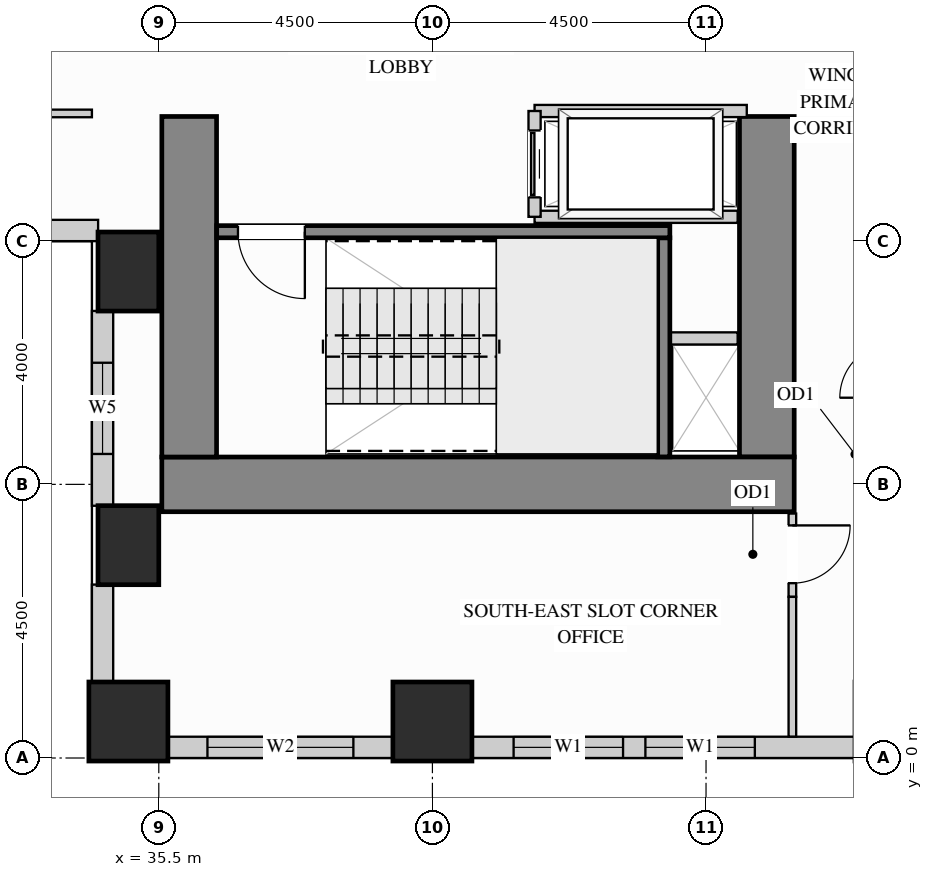
"""IFC4 building model, lengths in metres.
Left out: names, types, materials, properties, quantities, classifications, styles, units other than length and angle.
Written with IfcOpenShell. Run it as: python <this file> out.ifc"""

import sys

from ifc_helpers import new_model, si_unit, direction, frame, frame_2d, origin, origin_2d, place, context, subcontext, project, spatial, rectangle, extrude, source, transform, mapped, element, fill, save


model = new_model("IFC4")
c1 = context("Model", 3, precision=1e-05, world=origin(), true_north=direction((0.0, 1.0)))
c2 = subcontext(c1, "Body", "Model", "MODEL_VIEW")
j1 = project(units=[si_unit("LENGTHUNIT", "METRE"), si_unit("PLANEANGLEUNIT", "RADIAN")], contexts=[c1])
p1 = place(None, origin())
s1 = spatial("IfcSite", under=j1, at=p1, CompositionType="ELEMENT")
p2 = place(p1, origin())
s2 = spatial("IfcBuilding", under=s1, at=p2, CompositionType="ELEMENT")
p3 = place(p2, frame((0.0, 0.0, 26.1)))
s3 = spatial("IfcBuildingStorey", under=s2, at=p3, CompositionType="ELEMENT", Elevation=26.1)
m1 = source(origin(), c2, "Body", "SweptSolid", [
    extrude(rectangle(XDim=1.0, YDim=1.3, at=origin_2d()), origin(), (0.0, 0.0, 1.0), 3.38),
])
for number, where, z_axis, x_axis in (
    (1, (35.0, 3.5, 0.0), (0.0, 0.0, 1.0), (1.0, 0.0, 0.0)),
    (2, (35.0, 8.0, 0.0), (0.0, 0.0, 1.0), (1.0, 0.0, 0.0)),
):
    element("IfcColumn", number, at=place(p3, frame(where, z_axis=z_axis, x_axis=x_axis)), inside=s3, PredefinedType="COLUMN", context=c2, shape_type="MappedRepresentation", body=[
        mapped(m1, transform((0.0, 0.0, 0.0), x_axis=(1.0, 0.0, 0.0), y_axis=(0.0, 1.0, 0.0), z_axis=(0.0, 0.0, 1.0))),
    ])
m2 = source(origin(), c2, "Body", "SweptSolid", [
    extrude(rectangle(XDim=1.3, YDim=1.3, at=origin_2d()), origin(), (0.0, 0.0, 1.0), 3.38),
])
for number, where, z_axis, x_axis in (
    (3, (35.0, 0.6, 0.0), (0.0, 0.0, 1.0), (1.0, 0.0, 0.0)),
    (4, (40.0, 0.6, 0.0), (0.0, 0.0, 1.0), (1.0, 0.0, 0.0)),
):
    element("IfcColumn", number, at=place(p3, frame(where, z_axis=z_axis, x_axis=x_axis)), inside=s3, PredefinedType="COLUMN", context=c2, shape_type="MappedRepresentation", body=[
        mapped(m2, transform((0.0, 0.0, 0.0), x_axis=(1.0, 0.0, 0.0), y_axis=(0.0, 1.0, 0.0), z_axis=(0.0, 0.0, 1.0))),
    ])
m3 = source(origin(), c2, "Body", "SweptSolid", [
    extrude(rectangle(XDim=5.6, YDim=0.9, at=frame_2d((2.8, 0.0))), origin(), (0.0, 0.0, 1.0), 3.38),
])
p4 = place(p3, frame((45.5, 4.95, 0.0), z_axis=(0.0, 0.0, 1.0), x_axis=(0.0, 1.0, 0.0)))
e5 = element("IfcWall", 5, at=p4, inside=s3, PredefinedType="SHEAR", context=c2, shape_type="MappedRepresentation", body=[
    mapped(m3, transform((0.0, 0.0, 0.0), x_axis=(1.0, 0.0, 0.0), y_axis=(0.0, 1.0, 0.0), z_axis=(0.0, 0.0, 1.0))),
])
m4 = source(origin(), c2, "Body", "SweptSolid", [
    extrude(rectangle(XDim=10.4, YDim=0.9, at=frame_2d((5.2, 0.0))), origin(), (0.0, 0.0, 1.0), 3.38),
])
p5 = place(p3, frame((35.55, 4.5, 0.0), z_axis=(0.0, 0.0, 1.0), x_axis=(1.0, 0.0, 0.0)))
e6 = element("IfcWall", 6, at=p5, inside=s3, PredefinedType="SHEAR", context=c2, shape_type="MappedRepresentation", body=[
    mapped(m4, transform((0.0, 0.0, 0.0), x_axis=(1.0, 0.0, 0.0), y_axis=(0.0, 1.0, 0.0), z_axis=(0.0, 0.0, 1.0))),
])
p6 = place(p3, frame((36.0, 4.95, 0.0), z_axis=(0.0, 0.0, 1.0), x_axis=(0.0, 1.0, 0.0)))
e7 = element("IfcWall", 7, at=p6, inside=s3, PredefinedType="SHEAR", context=c2, shape_type="MappedRepresentation", body=[
    mapped(m3, transform((0.0, 0.0, 0.0), x_axis=(1.0, 0.0, 0.0), y_axis=(0.0, 1.0, 0.0), z_axis=(0.0, 0.0, 1.0))),
])
p7 = place(p3, frame((30.998, 8.675, 0.0), z_axis=(0.0, 0.0, 1.0), x_axis=(1.0, 0.0, 0.0)))
e8 = element("IfcWall", 8, at=p7, inside=s3, PredefinedType="SOLIDWALL", context=c2, shape_type="SweptSolid", body=[
    extrude(rectangle(XDim=3.504, YDim=0.35, at=frame_2d((1.752, 0.0))), origin(), (0.0, 0.0, 1.0), 3.365),
])
p8 = place(p7, frame((1.002, 0.0, 0.78)))
e9 = element("IfcOpeningElement", 9, at=p8, cuts=e8, PredefinedType="OPENING", context=c2, shape_type="SweptSolid", body=[
    extrude(rectangle(XDim=1.5, YDim=2.0, at=frame_2d((0.75, 1.0))), frame((0.0, 0.185, 0.0), z_axis=(0.0, -1.0, 0.0), x_axis=(1.0, 0.0, 0.0)), (0.0, 0.0, 1.0), 0.37),
])
p9 = place(p3, frame((34.575, 7.352, 0.0), z_axis=(0.0, 0.0, 1.0), x_axis=(0.0, -1.0, 0.0)))
e10 = element("IfcWall", 10, at=p9, inside=s3, PredefinedType="SOLIDWALL", context=c2, shape_type="SweptSolid", body=[
    extrude(rectangle(XDim=3.204, YDim=0.35, at=frame_2d((1.602, 0.0))), origin(), (0.0, 0.0, 1.0), 2.51),
])
p10 = place(p9, frame((0.852, 0.0, 0.78)))
e11 = element("IfcOpeningElement", 11, at=p10, cuts=e10, PredefinedType="OPENING", context=c2, shape_type="SweptSolid", body=[
    extrude(rectangle(XDim=1.5, YDim=1.55, at=frame_2d((0.75, 0.775))), frame((0.0, 0.185, 0.0), z_axis=(0.0, -1.0, 0.0), x_axis=(1.0, 0.0, 0.0)), (0.0, 0.0, 1.0), 0.37),
])
m5 = source(origin(), c2, "Body", "SweptSolid", [
    extrude(rectangle(XDim=1.604, YDim=0.35, at=frame_2d((0.802, 0.0))), origin(), (0.0, 0.0, 1.0), 2.51),
])
p11 = place(p3, frame((34.575, 2.852, 0.0), z_axis=(0.0, 0.0, 1.0), x_axis=(0.0, -1.0, 0.0)))
e12 = element("IfcWall", 12, at=p11, inside=s3, PredefinedType="SOLIDWALL", context=c2, shape_type="MappedRepresentation", body=[
    mapped(m5, transform((0.0, 0.0, 0.0), x_axis=(1.0, 0.0, 0.0), y_axis=(0.0, 1.0, 0.0), z_axis=(0.0, 0.0, 1.0))),
])
p12 = place(p3, frame((35.648, 0.175, 0.0), z_axis=(0.0, 0.0, 1.0), x_axis=(1.0, 0.0, 0.0)))
e13 = element("IfcWall", 13, at=p12, inside=s3, PredefinedType="SOLIDWALL", context=c2, shape_type="SweptSolid", body=[
    extrude(rectangle(XDim=3.704, YDim=0.35, at=frame_2d((1.852, 0.0))), origin(), (0.0, 0.0, 1.0), 2.51),
])
p13 = place(p12, frame((0.652, 0.0, 0.78)))
e14 = element("IfcOpeningElement", 14, at=p13, cuts=e13, PredefinedType="OPENING", context=c2, shape_type="SweptSolid", body=[
    extrude(rectangle(XDim=2.4, YDim=1.55, at=frame_2d((1.2, 0.775))), frame((0.0, 0.185, 0.0), z_axis=(0.0, -1.0, 0.0), x_axis=(1.0, 0.0, 0.0)), (0.0, 0.0, 1.0), 0.37),
])
p14 = place(p3, frame((40.648, 0.175, 0.0), z_axis=(0.0, 0.0, 1.0), x_axis=(1.0, 0.0, 0.0)))
e15 = element("IfcWall", 15, at=p14, inside=s3, PredefinedType="SOLIDWALL", context=c2, shape_type="SweptSolid", body=[
    extrude(rectangle(XDim=6.304, YDim=0.35, at=frame_2d((3.152, 0.0))), origin(), (0.0, 0.0, 1.0), 2.51),
])
p15 = place(p14, frame((0.687, 0.0, 0.78)))
e16 = element("IfcOpeningElement", 16, at=p15, cuts=e15, PredefinedType="OPENING", context=c2, shape_type="SweptSolid", body=[
    extrude(rectangle(XDim=1.8, YDim=1.55, at=frame_2d((0.9, 0.775))), frame((0.0, 0.185, 0.0), z_axis=(0.0, -1.0, 0.0), x_axis=(1.0, 0.0, 0.0)), (0.0, 0.0, 1.0), 0.37),
])
p16 = place(p14, frame((2.855, 0.0, 0.78)))
e17 = element("IfcOpeningElement", 17, at=p16, cuts=e15, PredefinedType="OPENING", context=c2, shape_type="SweptSolid", body=[
    extrude(rectangle(XDim=1.8, YDim=1.55, at=frame_2d((0.9, 0.775))), frame((0.0, 0.185, 0.0), z_axis=(0.0, -1.0, 0.0), x_axis=(1.0, 0.0, 0.0)), (0.0, 0.0, 1.0), 0.37),
])
p17 = place(p3, frame((45.92, 2.65, 0.0), z_axis=(0.0, 0.0, 1.0), x_axis=(0.0, 1.0, 0.0)))
e18 = element("IfcWall", 18, at=p17, inside=s3, PredefinedType="PARTITIONING", context=c2, shape_type="SweptSolid", body=[
    extrude(rectangle(XDim=1.37, YDim=0.125, at=frame_2d((0.685, 0.0))), origin(), (0.0, 0.0, 1.0), 3.365),
])
p18 = place(p17, frame((0.225, 0.0, 0.0)))
e19 = element("IfcOpeningElement", 19, at=p18, cuts=e18, PredefinedType="OPENING", context=c2, shape_type="SweptSolid", body=[
    extrude(rectangle(XDim=0.95, YDim=2.15, at=frame_2d((0.475, 1.075))), frame((0.0, 0.073, 0.0), z_axis=(0.0, -1.0, 0.0), x_axis=(1.0, 0.0, 0.0)), (0.0, 0.0, 1.0), 0.145),
])
m6 = source(origin(), c2, "Body", "SweptSolid", [
    extrude(rectangle(XDim=2.298, YDim=0.125, at=frame_2d((1.149, 0.0))), origin(), (0.0, 0.0, 1.0), 3.365),
])
p19 = place(p3, frame((45.92, 0.352, 0.0), z_axis=(0.0, 0.0, 1.0), x_axis=(0.0, 1.0, 0.0)))
e20 = element("IfcWall", 20, at=p19, inside=s3, PredefinedType="PARTITIONING", context=c2, shape_type="MappedRepresentation", body=[
    mapped(m6, transform((0.0, 0.0, 0.0), x_axis=(1.0, 0.0, 0.0), y_axis=(0.0, 1.0, 0.0), z_axis=(0.0, 0.0, 1.0))),
])
p20 = place(p3, frame((26.95, 10.6, 0.0), z_axis=(0.0, 0.0, 1.0), x_axis=(1.0, 0.0, 0.0)))
e21 = element("IfcWall", 21, at=p20, inside=s3, PredefinedType="PARTITIONING", context=c2, shape_type="SweptSolid", body=[
    extrude(rectangle(XDim=7.45, YDim=0.125, at=frame_2d((3.725, 0.0))), origin(), (0.0, 0.0, 1.0), 3.365),
])
p21 = place(p20, frame((4.683, 0.0, 0.0)))
e22 = element("IfcOpeningElement", 22, at=p21, cuts=e21, PredefinedType="OPENING", context=c2, shape_type="SweptSolid", body=[
    extrude(rectangle(XDim=0.95, YDim=2.15, at=frame_2d((0.475, 1.075))), frame((0.0, 0.073, 0.0), z_axis=(0.0, -1.0, 0.0), x_axis=(1.0, 0.0, 0.0)), (0.0, 0.0, 1.0), 0.145),
])
m7 = source(origin(), c2, "Body", "SweptSolid", [
    extrude(rectangle(XDim=1.17, YDim=0.2, at=frame_2d((0.585, 0.0))), origin(), (0.0, 0.0, 1.0), 3.365),
])
p22 = place(p3, frame((43.85, 6.9, 0.0), z_axis=(0.0, 0.0, 1.0), x_axis=(1.0, 0.0, 0.0)))
e23 = element("IfcWall", 23, at=p22, inside=s3, PredefinedType="PARTITIONING", context=c2, shape_type="MappedRepresentation", body=[
    mapped(m7, transform((0.0, 0.0, 0.0), x_axis=(1.0, 0.0, 0.0), y_axis=(0.0, 1.0, 0.0), z_axis=(0.0, 0.0, 1.0))),
])
m8 = source(origin(), c2, "Body", "SweptSolid", [
    extrude(rectangle(XDim=3.49, YDim=0.2, at=frame_2d((1.745, 0.0))), origin(), (0.0, 0.0, 1.0), 3.365),
])
p23 = place(p3, frame((41.68, 10.64, 0.0), z_axis=(0.0, 0.0, 1.0), x_axis=(1.0, 0.0, 0.0)))
e24 = element("IfcWall", 24, at=p23, inside=s3, PredefinedType="PARTITIONING", context=c2, shape_type="MappedRepresentation", body=[
    mapped(m8, transform((0.0, 0.0, 0.0), x_axis=(1.0, 0.0, 0.0), y_axis=(0.0, 1.0, 0.0), z_axis=(0.0, 0.0, 1.0))),
])
m9 = source(origin(), c2, "Body", "SweptSolid", [
    extrude(rectangle(XDim=3.34, YDim=0.2, at=frame_2d((1.67, 0.0))), origin(), (0.0, 0.0, 1.0), 3.365),
])
p24 = place(p3, frame((41.68, 8.9, 0.0), z_axis=(0.0, 0.0, 1.0), x_axis=(1.0, 0.0, 0.0)))
e25 = element("IfcWall", 25, at=p24, inside=s3, PredefinedType="PARTITIONING", context=c2, shape_type="MappedRepresentation", body=[
    mapped(m9, transform((0.0, 0.0, 0.0), x_axis=(1.0, 0.0, 0.0), y_axis=(0.0, 1.0, 0.0), z_axis=(0.0, 0.0, 1.0))),
])
p25 = place(p3, frame((41.68, 8.9, 0.0), z_axis=(0.0, 0.0, 1.0), x_axis=(0.0, 1.0, 0.0)))
e26 = element("IfcWall", 26, at=p25, inside=s3, PredefinedType="PARTITIONING", context=c2, shape_type="SweptSolid", body=[
    extrude(rectangle(XDim=1.74, YDim=0.2, at=frame_2d((0.87, 0.0))), origin(), (0.0, 0.0, 1.0), 3.365),
])
p26 = place(p25, frame((0.32, 0.0, 0.0)))
e27 = element("IfcOpeningElement", 27, at=p26, cuts=e26, PredefinedType="OPENING", context=c2, shape_type="SweptSolid", body=[
    extrude(rectangle(XDim=1.1, YDim=2.2, at=frame_2d((0.55, 1.1))), frame((0.0, 0.11, 0.0), z_axis=(0.0, -1.0, 0.0), x_axis=(1.0, 0.0, 0.0)), (0.0, 0.0, 1.0), 0.22),
])
m10 = source(origin(), c2, "Body", "SweptSolid", [
    extrude(rectangle(XDim=3.603, YDim=0.2, at=frame_2d((1.802, 0.0))), origin(), (0.0, 0.0, 1.0), 3.38),
])
p27 = place(p3, frame((43.805, 4.952, 0.0), z_axis=(0.0, 0.0, 1.0), x_axis=(0.0, 1.0, 0.0)))
e28 = element("IfcWall", 28, at=p27, inside=s3, PredefinedType="SHEAR", context=c2, shape_type="MappedRepresentation", body=[
    mapped(m10, transform((0.0, 0.0, 0.0), x_axis=(1.0, 0.0, 0.0), y_axis=(0.0, 1.0, 0.0), z_axis=(0.0, 0.0, 1.0))),
])
p28 = place(p3, frame((36.452, 8.655, 0.0), z_axis=(0.0, 0.0, 1.0), x_axis=(1.0, 0.0, 0.0)))
e29 = element("IfcWall", 29, at=p28, inside=s3, PredefinedType="SHEAR", context=c2, shape_type="SweptSolid", body=[
    extrude(rectangle(XDim=7.453, YDim=0.2, at=frame_2d((3.727, 0.0))), origin(), (0.0, 0.0, 1.0), 3.38),
])
p29 = place(p28, frame((0.35, 0.0, 0.0)))
e30 = element("IfcOpeningElement", 30, at=p29, cuts=e29, PredefinedType="OPENING", context=c2, shape_type="SweptSolid", body=[
    extrude(rectangle(XDim=1.1, YDim=2.15, at=frame_2d((0.55, 1.075))), frame((0.0, 0.11, 0.0), z_axis=(0.0, -1.0, 0.0), x_axis=(1.0, 0.0, 0.0)), (0.0, 0.0, 1.0), 0.22),
])
m11 = source(origin(), c2, "Body", "SweptSolid", [
    extrude(rectangle(XDim=1.1, YDim=2.2, at=frame_2d((0.55, 1.1))), frame((0.0, 0.025, 0.0), z_axis=(0.0, -1.0, 0.0), x_axis=(1.0, 0.0, 0.0)), (0.0, 0.0, 1.0), 0.05),
])
p30 = place(p26, origin())
e31 = element("IfcDoor", 31, at=p30, inside=s3, OperationType="SLIDING_TO_LEFT", PredefinedType="DOOR", context=c2, shape_type="MappedRepresentation", body=[
    mapped(m11, transform((0.0, 0.0, 0.0), x_axis=(1.0, 0.0, 0.0), y_axis=(0.0, 1.0, 0.0), z_axis=(0.0, 0.0, 1.0))),
])
fill(e27, e31)
m12 = source(origin(), c2, "Body", "SweptSolid", [
    extrude(rectangle(XDim=0.95, YDim=2.15, at=frame_2d((0.475, 1.075))), frame((0.0, 0.025, 0.0), z_axis=(0.0, -1.0, 0.0), x_axis=(1.0, 0.0, 0.0)), (0.0, 0.0, 1.0), 0.05),
])
p31 = place(p18, origin())
e32 = element("IfcDoor", 32, at=p31, inside=s3, OperationType="SINGLE_SWING_RIGHT", PredefinedType="DOOR", context=c2, shape_type="MappedRepresentation", body=[
    mapped(m12, transform((0.0, 0.0, 0.0), x_axis=(1.0, 0.0, 0.0), y_axis=(0.0, 1.0, 0.0), z_axis=(0.0, 0.0, 1.0))),
])
fill(e19, e32)
m13 = source(origin(), c2, "Body", "SweptSolid", [
    extrude(rectangle(XDim=1.1, YDim=2.15, at=frame_2d((0.55, 1.075))), frame((0.0, 0.025, 0.0), z_axis=(0.0, -1.0, 0.0), x_axis=(1.0, 0.0, 0.0)), (0.0, 0.0, 1.0), 0.05),
])
p32 = place(p29, origin())
e33 = element("IfcDoor", 33, at=p32, inside=s3, OperationType="SINGLE_SWING_RIGHT", PredefinedType="DOOR", context=c2, shape_type="MappedRepresentation", body=[
    mapped(m13, transform((0.0, 0.0, 0.0), x_axis=(1.0, 0.0, 0.0), y_axis=(0.0, 1.0, 0.0), z_axis=(0.0, 0.0, 1.0))),
])
fill(e30, e33)
m14 = source(origin(), c2, "Body", "SweptSolid", [
    extrude(rectangle(XDim=1.8, YDim=1.55, at=frame_2d((0.9, 0.775))), frame((0.0, 0.03, 0.0), z_axis=(0.0, -1.0, 0.0), x_axis=(1.0, 0.0, 0.0)), (0.0, 0.0, 1.0), 0.06),
])
p33 = place(p15, origin())
e34 = element("IfcWindow", 34, at=p33, inside=s3, PartitioningType="SINGLE_PANEL", PredefinedType="WINDOW", context=c2, shape_type="MappedRepresentation", body=[
    mapped(m14, transform((0.0, 0.0, 0.0), x_axis=(1.0, 0.0, 0.0), y_axis=(0.0, 1.0, 0.0), z_axis=(0.0, 0.0, 1.0))),
])
fill(e16, e34)
p34 = place(p16, origin())
e35 = element("IfcWindow", 35, at=p34, inside=s3, PartitioningType="SINGLE_PANEL", PredefinedType="WINDOW", context=c2, shape_type="MappedRepresentation", body=[
    mapped(m14, transform((0.0, 0.0, 0.0), x_axis=(1.0, 0.0, 0.0), y_axis=(0.0, 1.0, 0.0), z_axis=(0.0, 0.0, 1.0))),
])
fill(e17, e35)
m15 = source(origin(), c2, "Body", "SweptSolid", [
    extrude(rectangle(XDim=2.4, YDim=1.55, at=frame_2d((1.2, 0.775))), frame((0.0, 0.03, 0.0), z_axis=(0.0, -1.0, 0.0), x_axis=(1.0, 0.0, 0.0)), (0.0, 0.0, 1.0), 0.06),
])
p35 = place(p13, origin())
e36 = element("IfcWindow", 36, at=p35, inside=s3, PartitioningType="SINGLE_PANEL", PredefinedType="WINDOW", context=c2, shape_type="MappedRepresentation", body=[
    mapped(m15, transform((0.0, 0.0, 0.0), x_axis=(1.0, 0.0, 0.0), y_axis=(0.0, 1.0, 0.0), z_axis=(0.0, 0.0, 1.0))),
])
fill(e14, e36)
m16 = source(origin(), c2, "Body", "SweptSolid", [
    extrude(rectangle(XDim=1.5, YDim=1.55, at=frame_2d((0.75, 0.775))), frame((0.0, 0.03, 0.0), z_axis=(0.0, -1.0, 0.0), x_axis=(1.0, 0.0, 0.0)), (0.0, 0.0, 1.0), 0.06),
])
p36 = place(p10, origin())
e37 = element("IfcWindow", 37, at=p36, inside=s3, PartitioningType="SINGLE_PANEL", PredefinedType="WINDOW", context=c2, shape_type="MappedRepresentation", body=[
    mapped(m16, transform((0.0, 0.0, 0.0), x_axis=(1.0, 0.0, 0.0), y_axis=(0.0, 1.0, 0.0), z_axis=(0.0, 0.0, 1.0))),
])
fill(e11, e37)
save(model, sys.argv[1])
